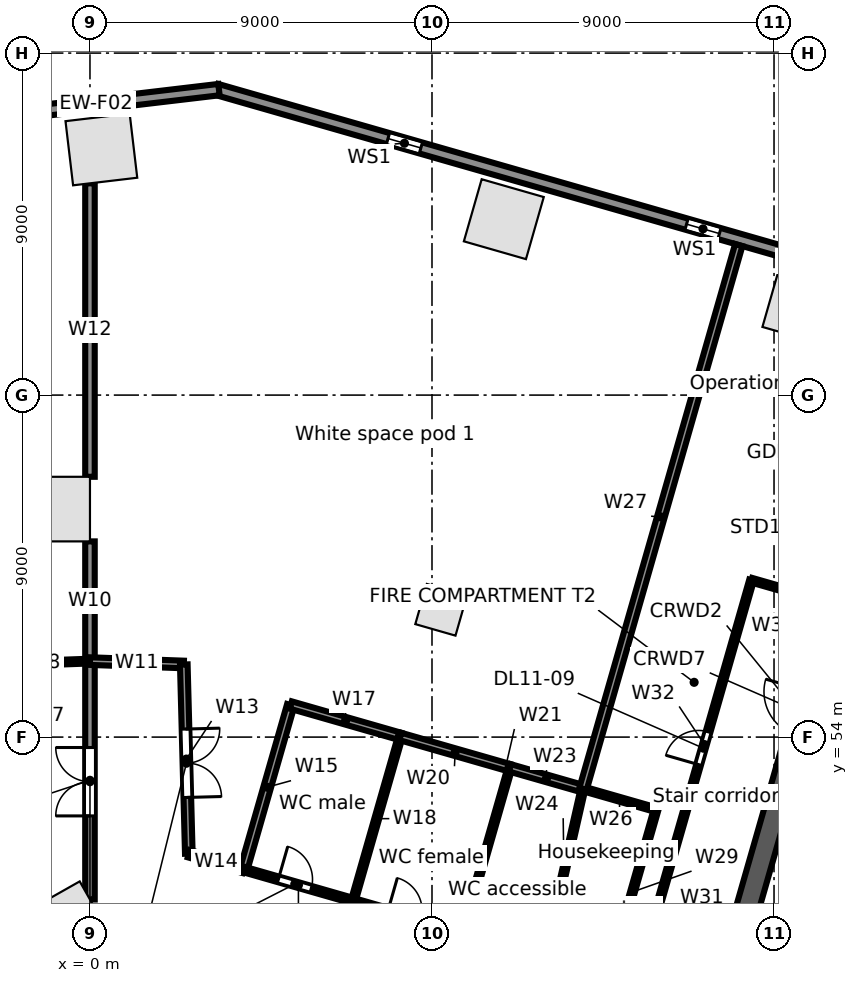
"""IFC4 building model, lengths in metres.
Left out: names, types, materials, properties, quantities, classifications, styles, units other than length and angle.
Written with IfcOpenShell. Run it as: python <this file> out.ifc"""

import sys

from ifc_helpers import new_model, si_unit, direction, frame, frame_2d, origin, origin_2d, place, context, subcontext, project, spatial, rectangle, extrude, element, fill, save


model = new_model("IFC4")
c1 = context("Model", 3, precision=1e-05, world=origin(), true_north=direction((0.0, 1.0)))
c2 = subcontext(c1, "Body", "Model", "MODEL_VIEW")
j1 = project(units=[si_unit("LENGTHUNIT", "METRE"), si_unit("PLANEANGLEUNIT", "RADIAN")], contexts=[c1])
p1 = place(None, origin())
s1 = spatial("IfcSite", under=j1, at=p1, CompositionType="ELEMENT")
p2 = place(p1, origin())
s2 = spatial("IfcBuilding", under=s1, at=p2, CompositionType="ELEMENT")
p3 = place(p2, frame((0.0, 0.0, 66.5)))
s3 = spatial("IfcBuildingStorey", under=s2, at=p3, CompositionType="ELEMENT", Elevation=66.5)
for number, where, z_axis, x_axis in (
    (1, (18.746, 65.376, 0.0), (0.0, 0.0, 1.0), (-0.961, 0.276, 0.0)),
    (2, (10.89, 67.629, 0.0), (0.0, 0.0, 1.0), (-0.961, 0.276, 0.0)),
    (3, (0.3, 69.464, 0.0), (0.0, 0.0, 1.0), (-0.993, -0.118, 0.0)),
    (4, (-0.591, 49.044, 0.0), (0.0, 0.0, 1.0), (0.87, 0.492, 0.0)),
    (5, (-0.85, 60.0, 0.0), (0.0, 0.0, 1.0), (0.0, 1.0, 0.0)),
):
    element("IfcColumn", number, at=place(p3, frame(where, z_axis=z_axis, x_axis=x_axis)), inside=s3, PredefinedType="COLUMN", context=c2, shape_type="SweptSolid", body=[
        extrude(rectangle(XDim=1.7, YDim=1.7, at=origin_2d()), origin(), (0.0, 0.0, 1.0), 5.0),
    ])
p4 = place(p3, frame((9.241, 57.35, 0.0), z_axis=(0.0, 0.0, 1.0), x_axis=(0.961261695938, -0.275637355817, 0.0)))
e6 = element("IfcColumn", 6, at=p4, inside=s3, PredefinedType="COLUMN", context=c2, shape_type="SweptSolid", body=[
    extrude(rectangle(XDim=1.1, YDim=1.1, at=origin_2d()), origin(), (0.0, 0.0, 1.0), 5.0),
])
p5 = place(p3, frame((3.335, 71.044, 0.0), z_axis=(0.0, 0.0, 1.0), x_axis=(0.961260130989, -0.275642813387, 0.0)))
e7 = element("IfcWall", 7, at=p5, inside=s3, PredefinedType="STANDARD", context=c2, shape_type="SweptSolid", body=[
    extrude(rectangle(XDim=32.741, YDim=0.3, at=frame_2d((16.371, 0.0))), origin(), (0.0, 0.0, 1.0), 4.68),
])
p6 = place(p5, frame((29.207, 0.0, 0.6)))
e8 = element("IfcOpeningElement", 8, at=p6, cuts=e7, PredefinedType="OPENING", context=c2, shape_type="SweptSolid", body=[
    extrude(rectangle(XDim=0.9, YDim=3.2, at=frame_2d((0.45, 1.6))), frame((0.0, 0.16, 0.0), z_axis=(0.0, -1.0, 0.0), x_axis=(1.0, 0.0, 0.0)), (0.0, 0.0, 1.0), 0.32),
])
p7 = place(p5, frame((21.034, 0.0, 0.6)))
e9 = element("IfcOpeningElement", 9, at=p7, cuts=e7, PredefinedType="OPENING", context=c2, shape_type="SweptSolid", body=[
    extrude(rectangle(XDim=0.9, YDim=3.2, at=frame_2d((0.45, 1.6))), frame((0.0, 0.16, 0.0), z_axis=(0.0, -1.0, 0.0), x_axis=(1.0, 0.0, 0.0)), (0.0, 0.0, 1.0), 0.32),
])
p8 = place(p5, frame((12.861, 0.0, 0.6)))
e10 = element("IfcOpeningElement", 10, at=p8, cuts=e7, PredefinedType="OPENING", context=c2, shape_type="SweptSolid", body=[
    extrude(rectangle(XDim=0.9, YDim=3.2, at=frame_2d((0.45, 1.6))), frame((0.0, 0.16, 0.0), z_axis=(0.0, -1.0, 0.0), x_axis=(1.0, 0.0, 0.0)), (0.0, 0.0, 1.0), 0.32),
])
p9 = place(p5, frame((4.688, 0.0, 0.6)))
e11 = element("IfcOpeningElement", 11, at=p9, cuts=e7, PredefinedType="OPENING", context=c2, shape_type="SweptSolid", body=[
    extrude(rectangle(XDim=0.9, YDim=3.2, at=frame_2d((0.45, 1.6))), frame((0.0, 0.16, 0.0), z_axis=(0.0, -1.0, 0.0), x_axis=(1.0, 0.0, 0.0)), (0.0, 0.0, 1.0), 0.32),
])
p10 = place(p3, frame((-3.076, 70.273, 0.0), z_axis=(0.0, 0.0, 1.0), x_axis=(0.993067743007, 0.117543429416, 0.0)))
e12 = element("IfcWall", 12, at=p10, inside=s3, PredefinedType="STANDARD", context=c2, shape_type="SweptSolid", body=[
    extrude(rectangle(XDim=6.516, YDim=0.3, at=frame_2d((3.258, 0.0))), origin(), (0.0, 0.0, 1.0), 4.68),
])
p11 = place(p3, frame((17.282, 49.427, 0.0), z_axis=(0.0, 0.0, 1.0), x_axis=(0.275631631629, 0.961263337304, 0.0)))
e13 = element("IfcWall", 13, at=p11, inside=s3, PredefinedType="SOLIDWALL", context=c2, shape_type="SweptSolid", body=[
    extrude(rectangle(XDim=10.8, YDim=0.6, at=frame_2d((5.4, 0.0))), origin(), (0.0, 0.0, 1.0), 4.68),
])
p12 = place(p11, frame((4.8, 0.0, 0.0)))
e14 = element("IfcOpeningElement", 14, at=p12, cuts=e13, PredefinedType="OPENING", context=c2, shape_type="SweptSolid", body=[
    extrude(rectangle(XDim=1.2, YDim=2.1, at=frame_2d((0.6, 1.05))), frame((0.0, 0.31, 0.0), z_axis=(0.0, -1.0, 0.0), x_axis=(1.0, 0.0, 0.0)), (0.0, 0.0, 1.0), 0.62),
])
p13 = place(p3, frame((-2.67, 55.904, 0.0), z_axis=(0.0, 0.0, 1.0), x_axis=(0.999354913865, 0.03591317494, 0.0)))
e15 = element("IfcWall", 15, at=p13, inside=s3, PredefinedType="PARTITIONING", context=c2, shape_type="SweptSolid", body=[
    extrude(rectangle(XDim=2.672, YDim=0.125, at=frame_2d((1.336, 0.0))), origin(), (0.0, 0.0, 1.0), 3.742),
])
p14 = place(p3, frame((0.0, 49.726, 0.0), z_axis=(0.0, 0.0, 1.0), x_axis=(0.0, 1.0, 0.0)))
e16 = element("IfcWall", 16, at=p14, inside=s3, PredefinedType="PARTITIONING", context=c2, shape_type="SweptSolid", body=[
    extrude(rectangle(XDim=6.274, YDim=0.25, at=frame_2d((3.137, 0.0))), origin(), (0.0, 0.0, 1.0), 4.68),
])
p15 = place(p14, frame((2.2, 0.0, 0.0)))
e17 = element("IfcOpeningElement", 17, at=p15, cuts=e16, PredefinedType="OPENING", context=c2, shape_type="SweptSolid", body=[
    extrude(rectangle(XDim=1.8, YDim=2.1, at=frame_2d((0.9, 1.05))), frame((0.0, 0.135, 0.0), z_axis=(0.0, -1.0, 0.0), x_axis=(1.0, 0.0, 0.0)), (0.0, 0.0, 1.0), 0.27),
])
p16 = place(p3, frame((0.0, 56.0, 0.0), z_axis=(0.0, 0.0, 1.0), x_axis=(0.0, 1.0, 0.0)))
e18 = element("IfcWall", 18, at=p16, inside=s3, PredefinedType="PARTITIONING", context=c2, shape_type="SweptSolid", body=[
    extrude(rectangle(XDim=3.15, YDim=0.25, at=frame_2d((1.575, 0.0))), origin(), (0.0, 0.0, 1.0), 4.68),
])
p17 = place(p3, frame((0.0, 56.0, 0.0), z_axis=(0.0, 0.0, 1.0), x_axis=(0.999349313684, -0.036068673934, 0.0)))
e19 = element("IfcWall", 19, at=p17, inside=s3, PredefinedType="PARTITIONING", context=c2, shape_type="SweptSolid", body=[
    extrude(rectangle(XDim=2.471, YDim=0.2, at=frame_2d((1.235, 0.0))), origin(), (0.0, 0.0, 1.0), 4.68),
])
p18 = place(p3, frame((0.0, 60.85, 0.0), z_axis=(0.0, 0.0, 1.0), x_axis=(0.0, 1.0, 0.0)))
e20 = element("IfcWall", 20, at=p18, inside=s3, PredefinedType="PARTITIONING", context=c2, shape_type="SweptSolid", body=[
    extrude(rectangle(XDim=7.723, YDim=0.25, at=frame_2d((3.861, 0.0))), origin(), (0.0, 0.0, 1.0), 3.952),
])
p19 = place(p3, frame((2.469, 55.911, 0.0), z_axis=(0.0, 0.0, 1.0), x_axis=(0.02651808123, -0.999648333849, 0.0)))
e21 = element("IfcWall", 21, at=p19, inside=s3, PredefinedType="PARTITIONING", context=c2, shape_type="SweptSolid", body=[
    extrude(rectangle(XDim=4.981, YDim=0.2, at=frame_2d((2.49, 0.0))), origin(), (0.0, 0.0, 1.0), 4.68),
])
p20 = place(p19, frame((1.7, 0.0, 0.0)))
e22 = element("IfcOpeningElement", 22, at=p20, cuts=e21, PredefinedType="OPENING", context=c2, shape_type="SweptSolid", body=[
    extrude(rectangle(XDim=1.8, YDim=2.1, at=frame_2d((0.9, 1.05))), frame((0.0, 0.11, 0.0), z_axis=(0.0, -1.0, 0.0), x_axis=(1.0, 0.0, 0.0)), (0.0, 0.0, 1.0), 0.22),
])
p21 = place(p3, frame((2.601, 50.932, 0.0), z_axis=(0.0, 0.0, 1.0), x_axis=(0.961197773994, -0.27586018065, 0.0)))
e23 = element("IfcWall", 23, at=p21, inside=s3, PredefinedType="PARTITIONING", context=c2, shape_type="SweptSolid", body=[
    extrude(rectangle(XDim=1.5, YDim=0.2, at=frame_2d((0.75, 0.0))), origin(), (0.0, 0.0, 1.0), 4.68),
])
p22 = place(p3, frame((4.043, 50.518, 0.0), z_axis=(0.0, 0.0, 1.0), x_axis=(0.275745553681, 0.96123066411, 0.0)))
e24 = element("IfcWall", 24, at=p22, inside=s3, PredefinedType="PARTITIONING", context=c2, shape_type="SweptSolid", body=[
    extrude(rectangle(XDim=4.5, YDim=0.2, at=frame_2d((2.25, 0.0))), origin(), (0.0, 0.0, 1.0), 4.68),
])
p23 = place(p3, frame((4.043, 50.518, 0.0), z_axis=(0.0, 0.0, 1.0), x_axis=(0.961247103494, -0.275688240636, 0.0)))
e25 = element("IfcWall", 25, at=p23, inside=s3, PredefinedType="PARTITIONING", context=c2, shape_type="SweptSolid", body=[
    extrude(rectangle(XDim=3.0, YDim=0.15, at=frame_2d((1.5, 0.0))), origin(), (0.0, 0.0, 1.0), 4.68),
])
p24 = place(p23, frame((0.95, 0.0, 0.0)))
e26 = element("IfcOpeningElement", 26, at=p24, cuts=e25, PredefinedType="OPENING", context=c2, shape_type="SweptSolid", body=[
    extrude(rectangle(XDim=0.9, YDim=2.1, at=frame_2d((0.45, 1.05))), frame((0.0, 0.085, 0.0), z_axis=(0.0, -1.0, 0.0), x_axis=(1.0, 0.0, 0.0)), (0.0, 0.0, 1.0), 0.17),
])
p25 = place(p3, frame((5.284, 54.844, 0.0), z_axis=(0.0, 0.0, 1.0), x_axis=(0.961243927922, -0.275699312717, 0.0)))
e27 = element("IfcWall", 27, at=p25, inside=s3, PredefinedType="PARTITIONING", context=c2, shape_type="SweptSolid", body=[
    extrude(rectangle(XDim=2.999, YDim=0.2, at=frame_2d((1.5, 0.0))), origin(), (0.0, 0.0, 1.0), 4.68),
])
p26 = place(p3, frame((6.927, 49.691, 0.0), z_axis=(0.0, 0.0, 1.0), x_axis=(0.275530671241, 0.961292280841, 0.0)))
e28 = element("IfcWall", 28, at=p26, inside=s3, PredefinedType="PARTITIONING", context=c2, shape_type="SweptSolid", body=[
    extrude(rectangle(XDim=4.5, YDim=0.125, at=frame_2d((2.25, 0.0))), origin(), (0.0, 0.0, 1.0), 4.68),
])
p27 = place(p3, frame((6.927, 49.691, 0.0), z_axis=(0.0, 0.0, 1.0), x_axis=(0.961268664977, -0.27561305073, 0.0)))
e29 = element("IfcWall", 29, at=p27, inside=s3, PredefinedType="PARTITIONING", context=c2, shape_type="SweptSolid", body=[
    extrude(rectangle(XDim=3.0, YDim=0.15, at=frame_2d((1.5, 0.0))), origin(), (0.0, 0.0, 1.0), 3.742),
])
p28 = place(p27, frame((0.95, 0.0, 0.0)))
e30 = element("IfcOpeningElement", 30, at=p28, cuts=e29, PredefinedType="OPENING", context=c2, shape_type="SweptSolid", body=[
    extrude(rectangle(XDim=0.9, YDim=2.1, at=frame_2d((0.45, 1.05))), frame((0.0, 0.085, 0.0), z_axis=(0.0, -1.0, 0.0), x_axis=(1.0, 0.0, 0.0)), (0.0, 0.0, 1.0), 0.17),
])
p29 = place(p3, frame((8.167, 54.017, 0.0), z_axis=(0.0, 0.0, 1.0), x_axis=(0.961247103494, -0.275688240636, 0.0)))
e31 = element("IfcWall", 31, at=p29, inside=s3, PredefinedType="PARTITIONING", context=c2, shape_type="SweptSolid", body=[
    extrude(rectangle(XDim=3.0, YDim=0.2, at=frame_2d((1.5, 0.0))), origin(), (0.0, 0.0, 1.0), 3.742),
])
p30 = place(p3, frame((9.811, 48.864, 0.0), z_axis=(0.0, 0.0, 1.0), x_axis=(0.275545040649, 0.96128816209, 0.0)))
e32 = element("IfcWall", 32, at=p30, inside=s3, PredefinedType="PARTITIONING", context=c2, shape_type="SweptSolid", body=[
    extrude(rectangle(XDim=4.5, YDim=0.125, at=frame_2d((2.25, 0.0))), origin(), (0.0, 0.0, 1.0), 4.68),
])
p31 = place(p3, frame((11.051, 53.19, 0.0), z_axis=(0.0, 0.0, 1.0), x_axis=(0.961316434736, -0.275446387355, 0.0)))
e33 = element("IfcWall", 33, at=p31, inside=s3, PredefinedType="PARTITIONING", context=c2, shape_type="SweptSolid", body=[
    extrude(rectangle(XDim=2.0, YDim=0.2, at=frame_2d((1.0, 0.0))), origin(), (0.0, 0.0, 1.0), 4.68),
])
p32 = place(p3, frame((11.973, 48.244, 0.0), z_axis=(0.0, 0.0, 1.0), x_axis=(0.222117362571, 0.975019936845, 0.0)))
e34 = element("IfcWall", 34, at=p32, inside=s3, PredefinedType="PARTITIONING", context=c2, shape_type="SweptSolid", body=[
    extrude(rectangle(XDim=4.508, YDim=0.125, at=frame_2d((2.254, 0.0))), origin(), (0.0, 0.0, 1.0), 4.68),
])
p33 = place(p3, frame((12.974, 52.639, 0.0), z_axis=(0.0, 0.0, 1.0), x_axis=(0.961270097305, -0.275608055084, 0.0)))
e35 = element("IfcWall", 35, at=p33, inside=s3, PredefinedType="PARTITIONING", context=c2, shape_type="SweptSolid", body=[
    extrude(rectangle(XDim=1.999, YDim=0.125, at=frame_2d((1.0, 0.0))), origin(), (0.0, 0.0, 1.0), 4.68),
])
p34 = place(p3, frame((12.974, 52.639, 0.0), z_axis=(0.0, 0.0, 1.0), x_axis=(0.275299463768, 0.961358520662, 0.0)))
e36 = element("IfcWall", 36, at=p34, inside=s3, PredefinedType="PARTITIONING", context=c2, shape_type="SweptSolid", body=[
    extrude(rectangle(XDim=14.885, YDim=0.2, at=frame_2d((7.443, 0.0))), origin(), (0.0, 0.0, 1.0), 3.742),
])
p35 = place(p3, frame((13.656, 47.762, 0.0), z_axis=(0.0, 0.0, 1.0), x_axis=(0.275545040649, 0.96128816209, 0.0)))
e37 = element("IfcWall", 37, at=p35, inside=s3, PredefinedType="PARTITIONING", context=c2, shape_type="SweptSolid", body=[
    extrude(rectangle(XDim=4.5, YDim=0.125, at=frame_2d((2.25, 0.0))), origin(), (0.0, 0.0, 1.0), 4.68),
])
p36 = place(p3, frame((14.928, 49.478, 0.0), z_axis=(0.0, 0.0, 1.0), x_axis=(0.275674053528, 0.961251172281, 0.0)))
e38 = element("IfcWall", 38, at=p36, inside=s3, PredefinedType="PARTITIONING", context=c2, shape_type="SweptSolid", body=[
    extrude(rectangle(XDim=9.0, YDim=0.125, at=frame_2d((4.5, 0.0))), origin(), (0.0, 0.0, 1.0), 3.742),
])
p37 = place(p36, frame((3.95, 0.0, 0.0)))
e39 = element("IfcOpeningElement", 39, at=p37, cuts=e38, PredefinedType="OPENING", context=c2, shape_type="SweptSolid", body=[
    extrude(rectangle(XDim=0.9, YDim=2.1, at=frame_2d((0.45, 1.05))), frame((0.0, 0.073, 0.0), z_axis=(0.0, -1.0, 0.0), x_axis=(1.0, 0.0, 0.0)), (0.0, 0.0, 1.0), 0.145),
])
p38 = place(p3, frame((17.409, 58.129, 0.0), z_axis=(0.0, 0.0, 1.0), x_axis=(0.961253165474, -0.275667103345, 0.0)))
e40 = element("IfcWall", 40, at=p38, inside=s3, PredefinedType="PARTITIONING", context=c2, shape_type="SweptSolid", body=[
    extrude(rectangle(XDim=1.977, YDim=0.125, at=frame_2d((0.988, 0.0))), origin(), (0.0, 0.0, 1.0), 4.68),
])
p39 = place(p8, origin())
e41 = element("IfcWindow", 41, at=p39, inside=s3, PartitioningType="SINGLE_PANEL", PredefinedType="WINDOW", context=c2, shape_type="SweptSolid", body=[
    extrude(rectangle(XDim=0.9, YDim=3.2, at=frame_2d((0.45, 1.6))), frame((0.0, 0.03, 0.0), z_axis=(0.0, -1.0, 0.0), x_axis=(1.0, 0.0, 0.0)), (0.0, 0.0, 1.0), 0.06),
])
fill(e10, e41)
p40 = place(p9, origin())
e42 = element("IfcWindow", 42, at=p40, inside=s3, PartitioningType="SINGLE_PANEL", PredefinedType="WINDOW", context=c2, shape_type="SweptSolid", body=[
    extrude(rectangle(XDim=0.9, YDim=3.2, at=frame_2d((0.45, 1.6))), frame((0.0, 0.03, 0.0), z_axis=(0.0, -1.0, 0.0), x_axis=(1.0, 0.0, 0.0)), (0.0, 0.0, 1.0), 0.06),
])
fill(e11, e42)
p41 = place(p24, origin())
e43 = element("IfcDoor", 43, at=p41, inside=s3, OperationType="SINGLE_SWING_LEFT", PredefinedType="DOOR", context=c2, shape_type="SweptSolid", body=[
    extrude(rectangle(XDim=0.9, YDim=2.1, at=frame_2d((0.45, 1.05))), frame((0.0, 0.025, 0.0), z_axis=(0.0, -1.0, 0.0), x_axis=(1.0, 0.0, 0.0)), (0.0, 0.0, 1.0), 0.05),
])
fill(e26, e43)
p42 = place(p20, origin())
e44 = element("IfcDoor", 44, at=p42, inside=s3, OperationType="DOUBLE_DOOR_SINGLE_SWING", PredefinedType="DOOR", context=c2, shape_type="SweptSolid", body=[
    extrude(rectangle(XDim=1.8, YDim=2.1, at=frame_2d((0.9, 1.05))), frame((0.0, 0.025, 0.0), z_axis=(0.0, -1.0, 0.0), x_axis=(1.0, 0.0, 0.0)), (0.0, 0.0, 1.0), 0.05),
])
fill(e22, e44)
p43 = place(p37, origin())
e45 = element("IfcDoor", 45, at=p43, inside=s3, OperationType="SINGLE_SWING_LEFT", PredefinedType="DOOR", context=c2, shape_type="SweptSolid", body=[
    extrude(rectangle(XDim=0.9, YDim=2.1, at=frame_2d((0.45, 1.05))), frame((0.0, 0.025, 0.0), z_axis=(0.0, -1.0, 0.0), x_axis=(1.0, 0.0, 0.0)), (0.0, 0.0, 1.0), 0.05),
])
fill(e39, e45)
p44 = place(p15, origin())
e46 = element("IfcDoor", 46, at=p44, inside=s3, OperationType="DOUBLE_DOOR_SINGLE_SWING", PredefinedType="DOOR", context=c2, shape_type="SweptSolid", body=[
    extrude(rectangle(XDim=1.8, YDim=2.1, at=frame_2d((0.9, 1.05))), frame((0.0, 0.025, 0.0), z_axis=(0.0, -1.0, 0.0), x_axis=(1.0, 0.0, 0.0)), (0.0, 0.0, 1.0), 0.05),
])
fill(e17, e46)
save(model, sys.argv[1])
